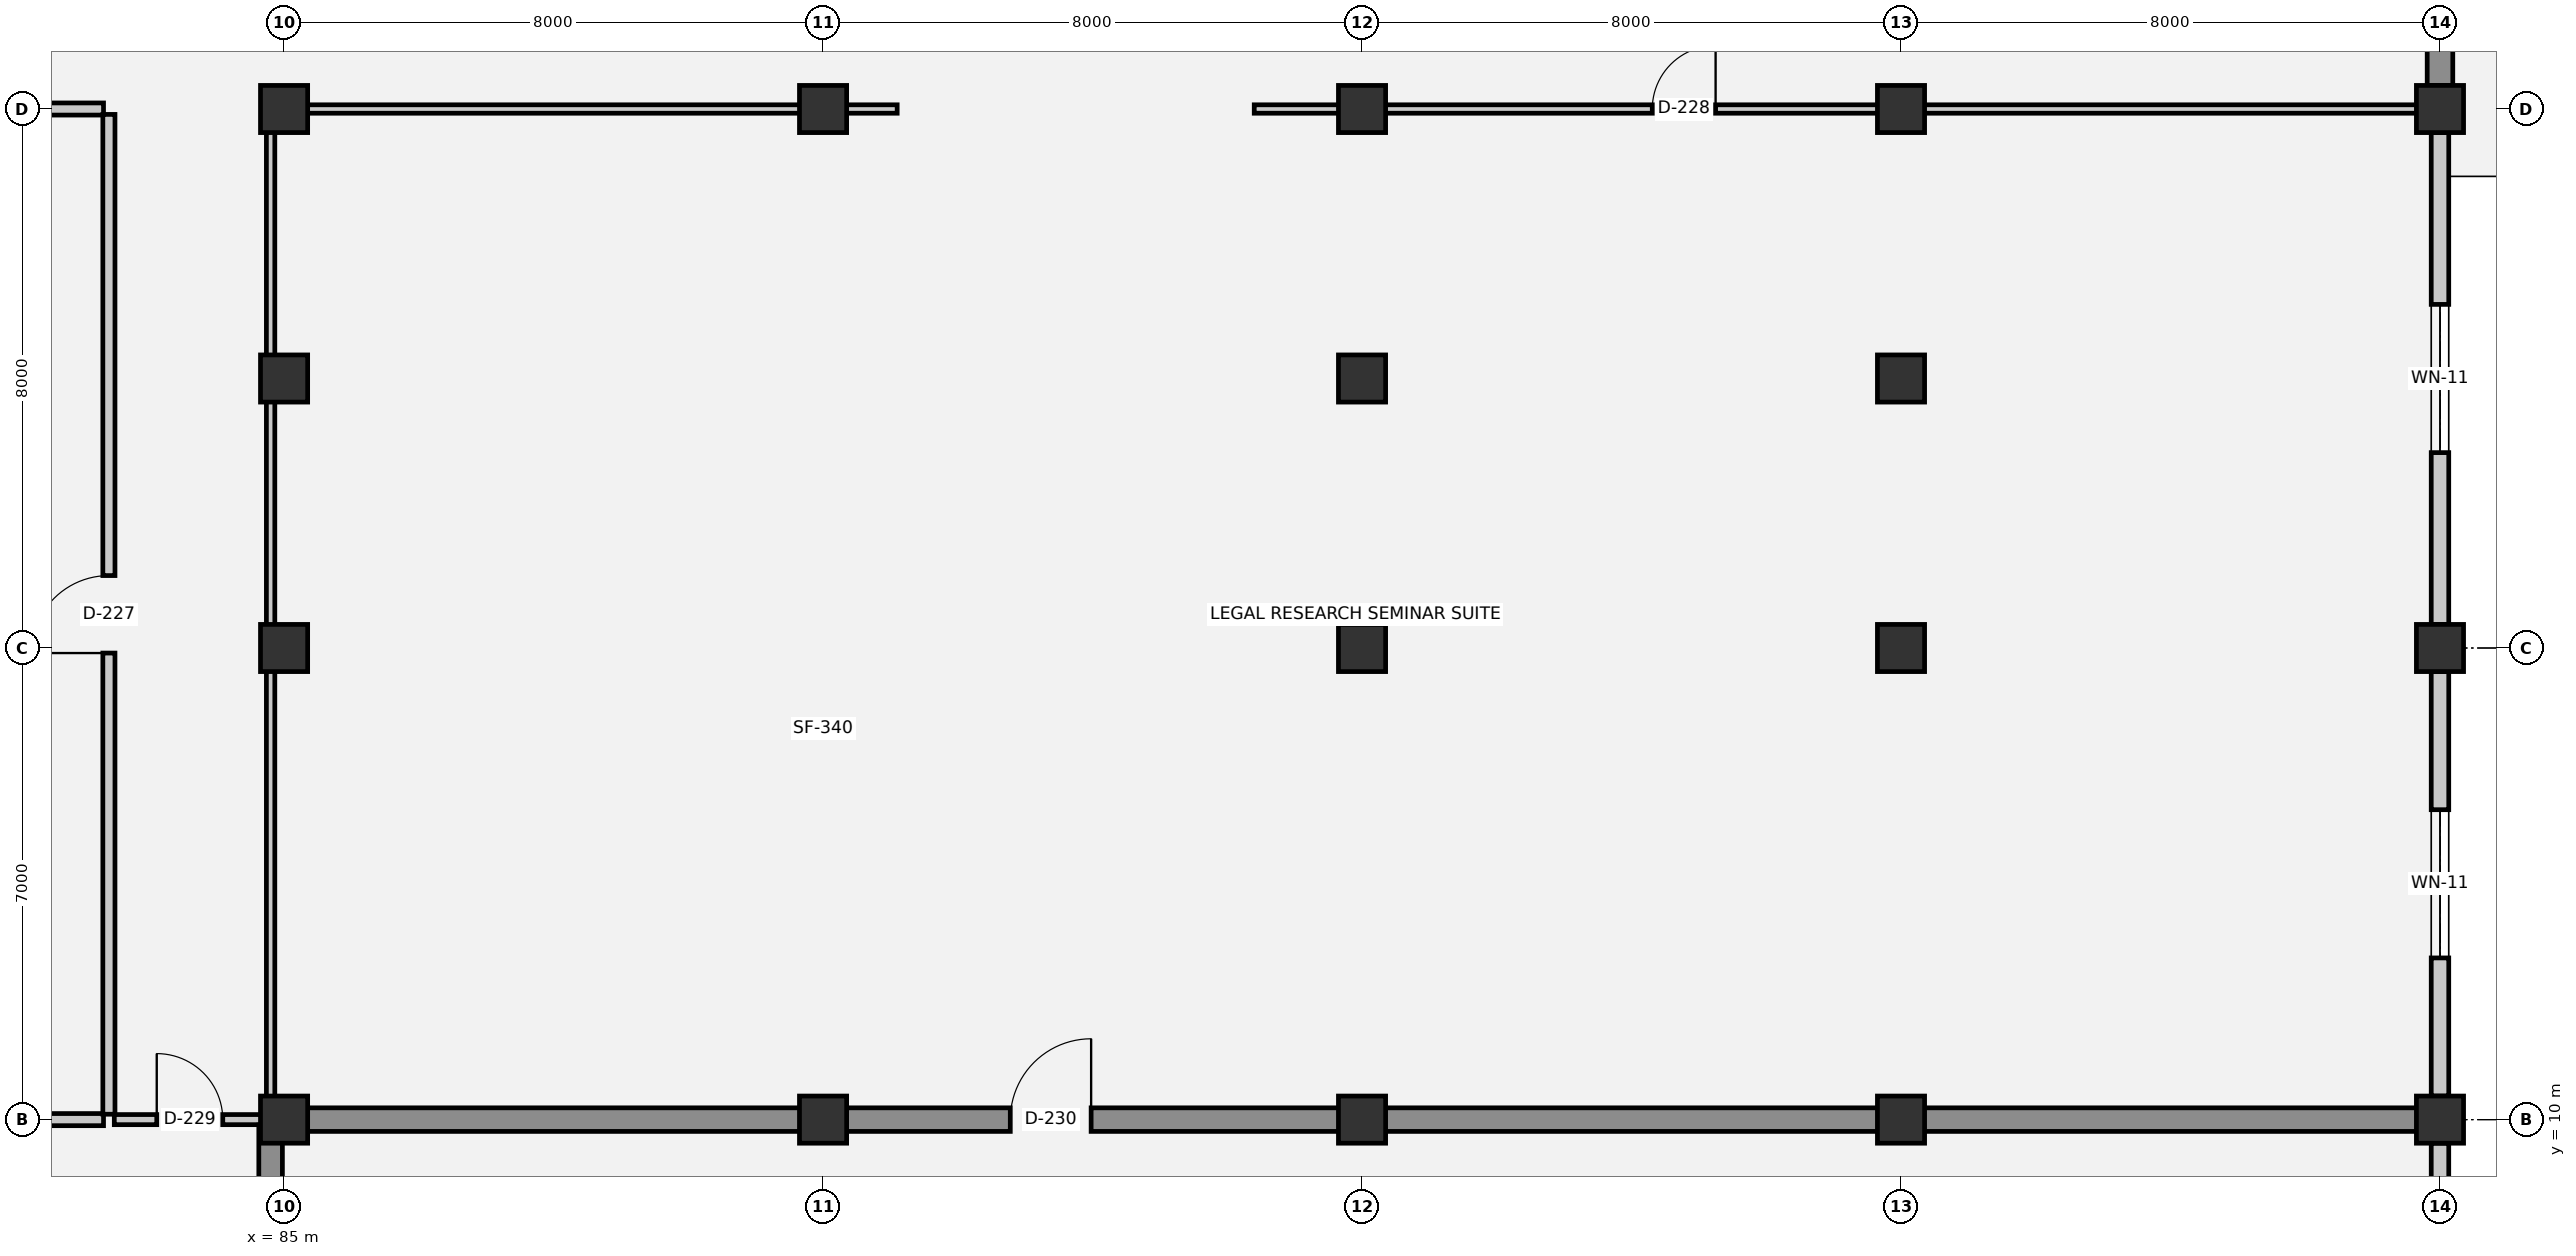
"""IFC4 building model, lengths in metres.
Left out: names, types, materials, properties, quantities, classifications, styles, units other than length and angle.
Written with IfcOpenShell. Run it as: python <this file> out.ifc"""

import sys

from ifc_helpers import new_model, si_unit, direction, frame, frame_2d, origin, origin_2d, place, context, subcontext, project, spatial, rectangle, circle, extrude, element, fill, save


model = new_model("IFC4")
c1 = context("Model", 3, precision=1e-05, world=origin(), true_north=direction((0.0, 1.0)))
c2 = subcontext(c1, "Body", "Model", "MODEL_VIEW")
j1 = project(units=[si_unit("LENGTHUNIT", "METRE"), si_unit("PLANEANGLEUNIT", "RADIAN")], contexts=[c1])
p1 = place(None, origin())
s1 = spatial("IfcSite", under=j1, at=p1, CompositionType="ELEMENT")
p2 = place(p1, origin())
s2 = spatial("IfcBuilding", under=s1, at=p2, CompositionType="ELEMENT")
p3 = place(p2, origin())
s3 = spatial("IfcBuildingStorey", under=s2, at=p3, CompositionType="ELEMENT", Elevation=0.0)
for number, where, z_axis, x_axis in (
    (1, (85.0, 10.0, 0.0), (0.0, 0.0, 1.0), (1.0, 0.0, 0.0)),
    (2, (85.0, 17.0, 0.0), (0.0, 0.0, 1.0), (1.0, 0.0, 0.0)),
    (3, (85.0, 25.0, 0.0), (0.0, 0.0, 1.0), (1.0, 0.0, 0.0)),
    (4, (93.0, 10.0, 0.0), (0.0, 0.0, 1.0), (1.0, 0.0, 0.0)),
    (5, (93.0, 25.0, 0.0), (0.0, 0.0, 1.0), (1.0, 0.0, 0.0)),
    (6, (101.0, 10.0, 0.0), (0.0, 0.0, 1.0), (1.0, 0.0, 0.0)),
    (7, (101.0, 17.0, 0.0), (0.0, 0.0, 1.0), (1.0, 0.0, 0.0)),
    (8, (101.0, 25.0, 0.0), (0.0, 0.0, 1.0), (1.0, 0.0, 0.0)),
    (9, (109.0, 10.0, 0.0), (0.0, 0.0, 1.0), (1.0, 0.0, 0.0)),
    (10, (109.0, 17.0, 0.0), (0.0, 0.0, 1.0), (1.0, 0.0, 0.0)),
    (11, (109.0, 25.0, 0.0), (0.0, 0.0, 1.0), (1.0, 0.0, 0.0)),
    (12, (117.0, 10.0, 0.0), (0.0, 0.0, 1.0), (1.0, 0.0, 0.0)),
    (13, (117.0, 17.0, 0.0), (0.0, 0.0, 1.0), (1.0, 0.0, 0.0)),
    (14, (117.0, 25.0, 0.0), (0.0, 0.0, 1.0), (1.0, 0.0, 0.0)),
):
    element("IfcColumn", number, at=place(p3, frame(where, z_axis=z_axis, x_axis=x_axis)), inside=s3, PredefinedType="COLUMN", context=c2, shape_type="SweptSolid", body=[
        extrude(rectangle(XDim=0.7, YDim=0.7, at=origin_2d()), origin(), (0.0, 0.0, 1.0), 5.4),
    ])
for number, where, z_axis, x_axis in (
    (15, (85.0, 21.0, 0.0), (0.0, 0.0, 1.0), (1.0, 0.0, 0.0)),
    (16, (101.0, 21.0, 0.0), (0.0, 0.0, 1.0), (1.0, 0.0, 0.0)),
    (17, (109.0, 21.0, 0.0), (0.0, 0.0, 1.0), (1.0, 0.0, 0.0)),
):
    element("IfcColumn", number, at=place(p3, frame(where, z_axis=z_axis, x_axis=x_axis)), inside=s3, PredefinedType="COLUMN", context=c2, shape_type="SweptSolid", body=[
        extrude(circle(Radius=0.35, at=origin_2d()), origin(), (0.0, 0.0, 1.0), 5.4),
    ])
p4 = place(p3, frame((117.0, 31.65, 0.0), z_axis=(0.0, 0.0, 1.0), x_axis=(0.0, -1.0, 0.0)))
e18 = element("IfcWall", 18, at=p4, inside=s3, PredefinedType="STANDARD", context=c2, shape_type="SweptSolid", body=[
    extrude(rectangle(XDim=6.3, YDim=0.38, at=frame_2d((3.15, 0.0))), origin(), (0.0, 0.0, 1.0), 4.34),
])
p5 = place(p4, frame((2.23, 0.0, 0.95)))
e19 = element("IfcOpeningElement", 19, at=p5, cuts=e18, PredefinedType="OPENING", context=c2, shape_type="SweptSolid", body=[
    extrude(rectangle(XDim=1.75, YDim=1.8, at=frame_2d((0.875, 0.9))), frame((0.0, 0.2, 0.0), z_axis=(0.0, -1.0, 0.0), x_axis=(1.0, 0.0, 0.0)), (0.0, 0.0, 1.0), 0.4),
])
p6 = place(p3, frame((117.0, 24.65, 0.0), z_axis=(0.0, 0.0, 1.0), x_axis=(0.0, -1.0, 0.0)))
e20 = element("IfcWall", 20, at=p6, inside=s3, PredefinedType="SOLIDWALL", context=c2, shape_type="SweptSolid", body=[
    extrude(rectangle(XDim=7.3, YDim=0.26, at=frame_2d((3.65, 0.0))), origin(), (0.0, 0.0, 1.0), 4.34),
])
p7 = place(p6, frame((2.55, 0.0, 0.9)))
e21 = element("IfcOpeningElement", 21, at=p7, cuts=e20, PredefinedType="OPENING", context=c2, shape_type="SweptSolid", body=[
    extrude(rectangle(XDim=2.2, YDim=1.9, at=frame_2d((1.1, 0.95))), frame((0.0, 0.14, 0.0), z_axis=(0.0, -1.0, 0.0), x_axis=(1.0, 0.0, 0.0)), (0.0, 0.0, 1.0), 0.28),
])
p8 = place(p3, frame((117.0, 16.65, 0.0), z_axis=(0.0, 0.0, 1.0), x_axis=(0.0, -1.0, 0.0)))
e22 = element("IfcWall", 22, at=p8, inside=s3, PredefinedType="SOLIDWALL", context=c2, shape_type="SweptSolid", body=[
    extrude(rectangle(XDim=6.3, YDim=0.26, at=frame_2d((3.15, 0.0))), origin(), (0.0, 0.0, 1.0), 4.34),
])
p9 = place(p8, frame((2.05, 0.0, 0.9)))
e23 = element("IfcOpeningElement", 23, at=p9, cuts=e22, PredefinedType="OPENING", context=c2, shape_type="SweptSolid", body=[
    extrude(rectangle(XDim=2.2, YDim=1.9, at=frame_2d((1.1, 0.95))), frame((0.0, 0.14, 0.0), z_axis=(0.0, -1.0, 0.0), x_axis=(1.0, 0.0, 0.0)), (0.0, 0.0, 1.0), 0.28),
])
p10 = place(p3, frame((117.0, 9.65, 0.0), z_axis=(0.0, 0.0, 1.0), x_axis=(0.0, -1.0, 0.0)))
e24 = element("IfcWall", 24, at=p10, inside=s3, PredefinedType="SOLIDWALL", context=c2, shape_type="SweptSolid", body=[
    extrude(rectangle(XDim=5.3, YDim=0.26, at=frame_2d((2.65, 0.0))), origin(), (0.0, 0.0, 1.0), 4.34),
])
p11 = place(p10, frame((1.675, 0.0, 0.9)))
e25 = element("IfcOpeningElement", 25, at=p11, cuts=e24, PredefinedType="OPENING", context=c2, shape_type="SweptSolid", body=[
    extrude(rectangle(XDim=1.95, YDim=1.85, at=frame_2d((0.975, 0.925))), frame((0.0, 0.14, 0.0), z_axis=(0.0, -1.0, 0.0), x_axis=(1.0, 0.0, 0.0)), (0.0, 0.0, 1.0), 0.28),
])
p12 = place(p3, frame((69.08, 10.0, 0.0), z_axis=(0.0, 0.0, 1.0), x_axis=(1.0, 0.0, 0.0)))
e26 = element("IfcWall", 26, at=p12, inside=s3, PredefinedType="PARTITIONING", context=c2, shape_type="SweptSolid", body=[
    extrude(rectangle(XDim=13.24, YDim=0.18, at=frame_2d((6.62, 0.0))), origin(), (0.0, 0.0, 1.0), 4.36),
])
p13 = place(p3, frame((82.48, 10.0, 0.0), z_axis=(0.0, 0.0, 1.0), x_axis=(1.0, 0.0, 0.0)))
e27 = element("IfcWall", 27, at=p13, inside=s3, PredefinedType="PARTITIONING", context=c2, shape_type="SweptSolid", body=[
    extrude(rectangle(XDim=2.24, YDim=0.15, at=frame_2d((1.12, 0.0))), origin(), (0.0, 0.0, 1.0), 4.36),
])
p14 = place(p13, frame((0.63, 0.0, 0.0)))
e28 = element("IfcOpeningElement", 28, at=p14, cuts=e27, PredefinedType="OPENING", context=c2, shape_type="SweptSolid", body=[
    extrude(rectangle(XDim=0.98, YDim=2.1, at=frame_2d((0.49, 1.05))), frame((0.0, 0.085, 0.0), z_axis=(0.0, -1.0, 0.0), x_axis=(1.0, 0.0, 0.0)), (0.0, 0.0, 1.0), 0.17),
])
p15 = place(p3, frame((84.88, 10.0, 0.0), z_axis=(0.0, 0.0, 1.0), x_axis=(1.0, 0.0, 0.0)))
e29 = element("IfcWall", 29, at=p15, inside=s3, PredefinedType="SHEAR", context=c2, shape_type="SweptSolid", body=[
    extrude(rectangle(XDim=32.04, YDim=0.35, at=frame_2d((16.02, 0.0))), origin(), (0.0, 0.0, 1.0), 5.04),
])
p16 = place(p15, frame((10.899, 0.0, 0.0)))
e30 = element("IfcOpeningElement", 30, at=p16, cuts=e29, PredefinedType="OPENING", context=c2, shape_type="SweptSolid", body=[
    extrude(rectangle(XDim=1.2, YDim=2.15, at=frame_2d((0.6, 1.075))), frame((0.0, 0.185, 0.0), z_axis=(0.0, -1.0, 0.0), x_axis=(1.0, 0.0, 0.0)), (0.0, 0.0, 1.0), 0.37),
])
p17 = place(p3, frame((69.08, 25.0, 0.0), z_axis=(0.0, 0.0, 1.0), x_axis=(1.0, 0.0, 0.0)))
e31 = element("IfcWall", 31, at=p17, inside=s3, PredefinedType="PARTITIONING", context=c2, shape_type="SweptSolid", body=[
    extrude(rectangle(XDim=13.24, YDim=0.18, at=frame_2d((6.62, 0.0))), origin(), (0.0, 0.0, 1.0), 4.36),
])
p18 = place(p3, frame((84.88, 25.0, 0.0), z_axis=(0.0, 0.0, 1.0), x_axis=(1.0, 0.0, 0.0)))
e32 = element("IfcWall", 32, at=p18, inside=s3, PredefinedType="PARTITIONING", context=c2, shape_type="SweptSolid", body=[
    extrude(rectangle(XDim=9.22, YDim=0.125, at=frame_2d((4.61, 0.0))), origin(), (0.0, 0.0, 1.0), 4.36),
])
p19 = place(p3, frame((99.4, 25.0, 0.0), z_axis=(0.0, 0.0, 1.0), x_axis=(1.0, 0.0, 0.0)))
e33 = element("IfcWall", 33, at=p19, inside=s3, PredefinedType="PARTITIONING", context=c2, shape_type="SweptSolid", body=[
    extrude(rectangle(XDim=17.52, YDim=0.125, at=frame_2d((8.76, 0.0))), origin(), (0.0, 0.0, 1.0), 4.36),
])
p20 = place(p19, frame((5.908, 0.0, 0.0)))
e34 = element("IfcOpeningElement", 34, at=p20, cuts=e33, PredefinedType="OPENING", context=c2, shape_type="SweptSolid", body=[
    extrude(rectangle(XDim=0.94, YDim=2.15, at=frame_2d((0.47, 1.075))), frame((0.0, 0.073, 0.0), z_axis=(0.0, -1.0, 0.0), x_axis=(1.0, 0.0, 0.0)), (0.0, 0.0, 1.0), 0.145),
])
p21 = place(p3, frame((82.4, 10.08, 0.0), z_axis=(0.0, 0.0, 1.0), x_axis=(0.0, 1.0, 0.0)))
e35 = element("IfcWall", 35, at=p21, inside=s3, PredefinedType="PARTITIONING", context=c2, shape_type="SweptSolid", body=[
    extrude(rectangle(XDim=14.84, YDim=0.18, at=frame_2d((7.42, 0.0))), origin(), (0.0, 0.0, 1.0), 5.04),
])
p22 = place(p21, frame((6.845, 0.0, 0.0)))
e36 = element("IfcOpeningElement", 36, at=p22, cuts=e35, PredefinedType="OPENING", context=c2, shape_type="SweptSolid", body=[
    extrude(rectangle(XDim=1.15, YDim=2.2, at=frame_2d((0.575, 1.1))), frame((0.0, 0.1, 0.0), z_axis=(0.0, -1.0, 0.0), x_axis=(1.0, 0.0, 0.0)), (0.0, 0.0, 1.0), 0.2),
])
p23 = place(p3, frame((84.8, 4.08, 0.0), z_axis=(0.0, 0.0, 1.0), x_axis=(0.0, 1.0, 0.0)))
e37 = element("IfcWall", 37, at=p23, inside=s3, PredefinedType="SHEAR", context=c2, shape_type="SweptSolid", body=[
    extrude(rectangle(XDim=5.84, YDim=0.35, at=frame_2d((2.92, 0.0))), origin(), (0.0, 0.0, 1.0), 5.04),
])
p24 = place(p3, frame((84.8, 10.08, 0.0), z_axis=(0.0, 0.0, 1.0), x_axis=(0.0, 1.0, 0.0)))
e38 = element("IfcWall", 38, at=p24, inside=s3, PredefinedType="PARTITIONING", context=c2, shape_type="SweptSolid", body=[
    extrude(rectangle(XDim=14.84, YDim=0.125, at=frame_2d((7.42, 0.0))), origin(), (0.0, 0.0, 1.0), 4.51),
])
p25 = place(p7, origin())
e39 = element("IfcWindow", 39, at=p25, inside=s3, PartitioningType="SINGLE_PANEL", PredefinedType="WINDOW", context=c2, shape_type="SweptSolid", body=[
    extrude(rectangle(XDim=2.2, YDim=1.9, at=frame_2d((1.1, 0.95))), frame((0.0, 0.03, 0.0), z_axis=(0.0, -1.0, 0.0), x_axis=(1.0, 0.0, 0.0)), (0.0, 0.0, 1.0), 0.06),
])
fill(e21, e39)
p26 = place(p9, origin())
e40 = element("IfcWindow", 40, at=p26, inside=s3, PartitioningType="SINGLE_PANEL", PredefinedType="WINDOW", context=c2, shape_type="SweptSolid", body=[
    extrude(rectangle(XDim=2.2, YDim=1.9, at=frame_2d((1.1, 0.95))), frame((0.0, 0.03, 0.0), z_axis=(0.0, -1.0, 0.0), x_axis=(1.0, 0.0, 0.0)), (0.0, 0.0, 1.0), 0.06),
])
fill(e23, e40)
p27 = place(p22, origin())
e41 = element("IfcDoor", 41, at=p27, inside=s3, OperationType="SINGLE_SWING_LEFT", PredefinedType="DOOR", context=c2, shape_type="SweptSolid", body=[
    extrude(rectangle(XDim=1.15, YDim=2.2, at=frame_2d((0.575, 1.1))), frame((0.0, 0.025, 0.0), z_axis=(0.0, -1.0, 0.0), x_axis=(1.0, 0.0, 0.0)), (0.0, 0.0, 1.0), 0.05),
])
fill(e36, e41)
p28 = place(p20, origin())
e42 = element("IfcDoor", 42, at=p28, inside=s3, OperationType="SINGLE_SWING_RIGHT", PredefinedType="DOOR", context=c2, shape_type="SweptSolid", body=[
    extrude(rectangle(XDim=0.94, YDim=2.15, at=frame_2d((0.47, 1.075))), frame((0.0, 0.025, 0.0), z_axis=(0.0, -1.0, 0.0), x_axis=(1.0, 0.0, 0.0)), (0.0, 0.0, 1.0), 0.05),
])
fill(e34, e42)
p29 = place(p14, origin())
e43 = element("IfcDoor", 43, at=p29, inside=s3, OperationType="SINGLE_SWING_LEFT", PredefinedType="DOOR", context=c2, shape_type="SweptSolid", body=[
    extrude(rectangle(XDim=0.98, YDim=2.1, at=frame_2d((0.49, 1.05))), frame((0.0, 0.025, 0.0), z_axis=(0.0, -1.0, 0.0), x_axis=(1.0, 0.0, 0.0)), (0.0, 0.0, 1.0), 0.05),
])
fill(e28, e43)
p30 = place(p16, origin())
e44 = element("IfcDoor", 44, at=p30, inside=s3, OperationType="SINGLE_SWING_RIGHT", PredefinedType="DOOR", context=c2, shape_type="SweptSolid", body=[
    extrude(rectangle(XDim=1.2, YDim=2.15, at=frame_2d((0.6, 1.075))), frame((0.0, 0.025, 0.0), z_axis=(0.0, -1.0, 0.0), x_axis=(1.0, 0.0, 0.0)), (0.0, 0.0, 1.0), 0.05),
])
fill(e30, e44)
save(model, sys.argv[1])
